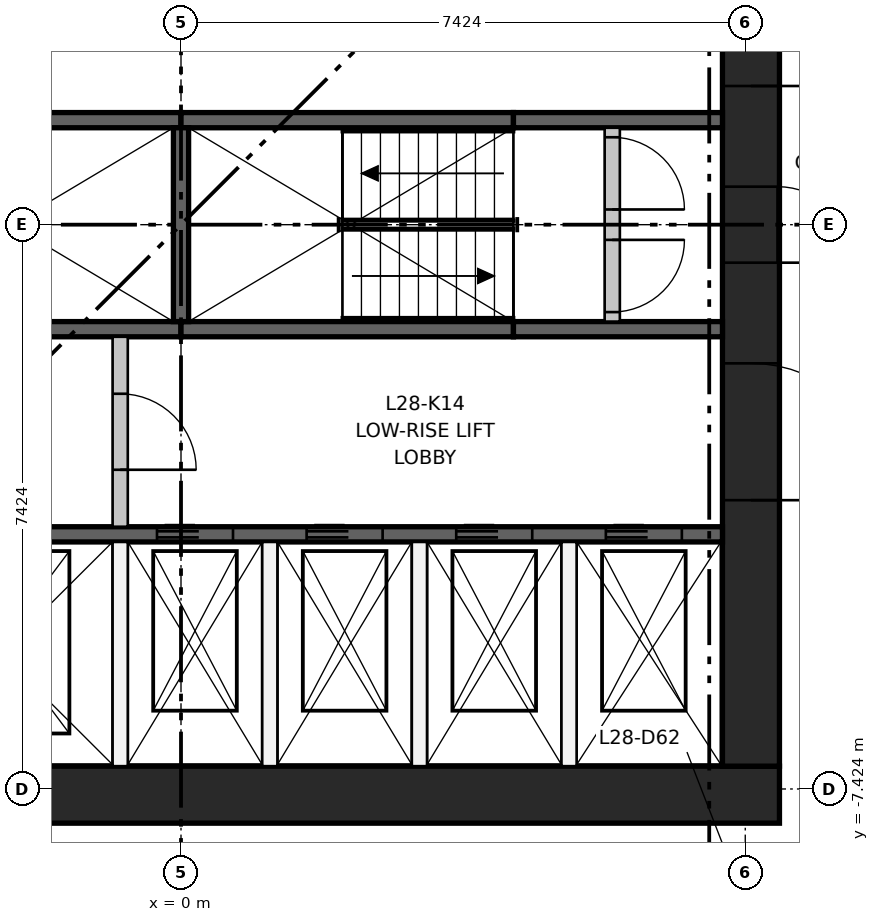
"""IFC4 building model, lengths in metres.
Left out: names, types, materials, properties, quantities, classifications, styles, units other than length and angle.
Written with IfcOpenShell. Run it as: python <this file> out.ifc"""

import sys

from ifc_helpers import new_model, si_unit, direction, frame, frame_2d, origin, place, context, subcontext, project, spatial, rectangle, extrude, element, fill, save


model = new_model("IFC4")
c1 = context("Model", 3, precision=1e-05, world=origin(), true_north=direction((0.0, 1.0)))
c2 = subcontext(c1, "Body", "Model", "MODEL_VIEW")
j1 = project(units=[si_unit("LENGTHUNIT", "METRE"), si_unit("PLANEANGLEUNIT", "RADIAN")], contexts=[c1])
p1 = place(None, origin())
s1 = spatial("IfcSite", under=j1, at=p1, CompositionType="ELEMENT")
p2 = place(p1, origin())
s2 = spatial("IfcBuilding", under=s1, at=p2, CompositionType="ELEMENT")
p3 = place(p2, frame((0.0, 0.0, 109.25)))
s3 = spatial("IfcBuildingStorey", under=s2, at=p3, CompositionType="ELEMENT", Elevation=109.25)
p4 = place(p3, frame((-7.874, -7.499, 0.0), z_axis=(0.0, 0.0, 1.0), x_axis=(1.0, 0.0, 0.0)))
e1 = element("IfcWall", 1, at=p4, inside=s3, PredefinedType="SHEAR", context=c2, shape_type="SweptSolid", body=[
    extrude(rectangle(XDim=15.748, YDim=0.75, at=frame_2d((7.874, 0.0))), origin(), (0.0, 0.0, 1.0), 3.65),
])
p5 = place(p3, frame((7.499, -7.124, 0.0), z_axis=(0.0, 0.0, 1.0), x_axis=(0.0, 1.0, 0.0)))
e2 = element("IfcWall", 2, at=p5, inside=s3, PredefinedType="SHEAR", context=c2, shape_type="SweptSolid", body=[
    extrude(rectangle(XDim=14.248, YDim=0.75, at=frame_2d((7.124, 0.0))), origin(), (0.0, 0.0, 1.0), 3.65),
])
p6 = place(p5, frame((6.624, 0.0, 0.0)))
e3 = element("IfcOpeningElement", 3, at=p6, cuts=e2, PredefinedType="OPENING", context=c2, shape_type="SweptSolid", body=[
    extrude(rectangle(XDim=1.0, YDim=2.1, at=frame_2d((0.5, 1.05))), frame((0.0, 0.385, 0.0), z_axis=(0.0, -1.0, 0.0), x_axis=(1.0, 0.0, 0.0)), (0.0, 0.0, 1.0), 0.77),
])
p7 = place(p5, frame((3.5, 0.0, 0.0)))
e4 = element("IfcOpeningElement", 4, at=p7, cuts=e2, PredefinedType="OPENING", context=c2, shape_type="SweptSolid", body=[
    extrude(rectangle(XDim=1.8, YDim=2.1, at=frame_2d((0.9, 1.05))), frame((0.0, 0.385, 0.0), z_axis=(0.0, -1.0, 0.0), x_axis=(1.0, 0.0, 0.0)), (0.0, 0.0, 1.0), 0.77),
])
p8 = place(p5, frame((8.948, 0.0, 0.0)))
e5 = element("IfcOpeningElement", 5, at=p8, cuts=e2, PredefinedType="OPENING", context=c2, shape_type="SweptSolid", body=[
    extrude(rectangle(XDim=1.8, YDim=2.1, at=frame_2d((0.9, 1.05))), frame((0.0, 0.385, 0.0), z_axis=(0.0, -1.0, 0.0), x_axis=(1.0, 0.0, 0.0)), (0.0, 0.0, 1.0), 0.77),
])
p9 = place(p3, frame((-7.124, -4.074, 0.0), z_axis=(0.0, 0.0, 1.0), x_axis=(1.0, 0.0, 0.0)))
e6 = element("IfcWall", 6, at=p9, inside=s3, PredefinedType="SHEAR", context=c2, shape_type="SweptSolid", body=[
    extrude(rectangle(XDim=14.248, YDim=0.2, at=frame_2d((7.124, 0.0))), origin(), (0.0, 0.0, 1.0), 3.3),
])
p10 = place(p9, frame((1.069, 0.0, 0.0)))
e7 = element("IfcOpeningElement", 7, at=p10, cuts=e6, PredefinedType="OPENING", context=c2, shape_type="SweptSolid", body=[
    extrude(rectangle(XDim=1.1, YDim=2.1, at=frame_2d((0.55, 1.05))), frame((0.0, 0.11, 0.0), z_axis=(0.0, -1.0, 0.0), x_axis=(1.0, 0.0, 0.0)), (0.0, 0.0, 1.0), 0.22),
])
p11 = place(p9, frame((4.206, 0.0, 0.0)))
e8 = element("IfcOpeningElement", 8, at=p11, cuts=e6, PredefinedType="OPENING", context=c2, shape_type="SweptSolid", body=[
    extrude(rectangle(XDim=1.1, YDim=2.1, at=frame_2d((0.55, 1.05))), frame((0.0, 0.11, 0.0), z_axis=(0.0, -1.0, 0.0), x_axis=(1.0, 0.0, 0.0)), (0.0, 0.0, 1.0), 0.22),
])
p12 = place(p9, frame((6.808, 0.0, 0.0)))
e9 = element("IfcOpeningElement", 9, at=p12, cuts=e6, PredefinedType="OPENING", context=c2, shape_type="SweptSolid", body=[
    extrude(rectangle(XDim=1.0, YDim=2.1, at=frame_2d((0.5, 1.05))), frame((0.0, 0.11, 0.0), z_axis=(0.0, -1.0, 0.0), x_axis=(1.0, 0.0, 0.0)), (0.0, 0.0, 1.0), 0.22),
])
p13 = place(p9, frame((8.777, 0.0, 0.0)))
e10 = element("IfcOpeningElement", 10, at=p13, cuts=e6, PredefinedType="OPENING", context=c2, shape_type="SweptSolid", body=[
    extrude(rectangle(XDim=1.0, YDim=2.1, at=frame_2d((0.5, 1.05))), frame((0.0, 0.11, 0.0), z_axis=(0.0, -1.0, 0.0), x_axis=(1.0, 0.0, 0.0)), (0.0, 0.0, 1.0), 0.22),
])
p14 = place(p9, frame((10.745, 0.0, 0.0)))
e11 = element("IfcOpeningElement", 11, at=p14, cuts=e6, PredefinedType="OPENING", context=c2, shape_type="SweptSolid", body=[
    extrude(rectangle(XDim=1.0, YDim=2.1, at=frame_2d((0.5, 1.05))), frame((0.0, 0.11, 0.0), z_axis=(0.0, -1.0, 0.0), x_axis=(1.0, 0.0, 0.0)), (0.0, 0.0, 1.0), 0.22),
])
p15 = place(p9, frame((12.714, 0.0, 0.0)))
e12 = element("IfcOpeningElement", 12, at=p15, cuts=e6, PredefinedType="OPENING", context=c2, shape_type="SweptSolid", body=[
    extrude(rectangle(XDim=1.0, YDim=2.1, at=frame_2d((0.5, 1.05))), frame((0.0, 0.11, 0.0), z_axis=(0.0, -1.0, 0.0), x_axis=(1.0, 0.0, 0.0)), (0.0, 0.0, 1.0), 0.22),
])
for number, where, z_axis, x_axis in (
    (13, (-4.374, -1.375, 0.0), (0.0, 0.0, 1.0), (1.0, 0.0, 0.0)),
    (14, (0.0, -1.375, 0.0), (0.0, 0.0, 1.0), (1.0, 0.0, 0.0)),
):
    element("IfcWall", number, at=place(p3, frame(where, z_axis=z_axis, x_axis=x_axis)), inside=s3, PredefinedType="SHEAR", context=c2, shape_type="SweptSolid", body=[
        extrude(rectangle(XDim=4.374, YDim=0.2, at=frame_2d((2.187, 0.0))), origin(), (0.0, 0.0, 1.0), 3.3),
    ])
p16 = place(p3, frame((4.374, -1.375, 0.0), z_axis=(0.0, 0.0, 1.0), x_axis=(1.0, 0.0, 0.0)))
e15 = element("IfcWall", 15, at=p16, inside=s3, PredefinedType="SHEAR", context=c2, shape_type="SweptSolid", body=[
    extrude(rectangle(XDim=2.75, YDim=0.2, at=frame_2d((1.375, 0.0))), origin(), (0.0, 0.0, 1.0), 3.3),
])
for number, where, z_axis, x_axis in (
    (16, (-4.374, 1.375, 0.0), (0.0, 0.0, 1.0), (1.0, 0.0, 0.0)),
    (17, (0.0, 1.375, 0.0), (0.0, 0.0, 1.0), (1.0, 0.0, 0.0)),
):
    element("IfcWall", number, at=place(p3, frame(where, z_axis=z_axis, x_axis=x_axis)), inside=s3, PredefinedType="SHEAR", context=c2, shape_type="SweptSolid", body=[
        extrude(rectangle(XDim=4.374, YDim=0.2, at=frame_2d((2.187, 0.0))), origin(), (0.0, 0.0, 1.0), 3.3),
    ])
p17 = place(p3, frame((4.374, 1.375, 0.0), z_axis=(0.0, 0.0, 1.0), x_axis=(1.0, 0.0, 0.0)))
e18 = element("IfcWall", 18, at=p17, inside=s3, PredefinedType="SHEAR", context=c2, shape_type="SweptSolid", body=[
    extrude(rectangle(XDim=2.75, YDim=0.2, at=frame_2d((1.375, 0.0))), origin(), (0.0, 0.0, 1.0), 3.3),
])
p18 = place(p3, frame((0.0, -1.275, 0.0), z_axis=(0.0, 0.0, 1.0), x_axis=(0.0, 1.0, 0.0)))
e19 = element("IfcWall", 19, at=p18, inside=s3, PredefinedType="SHEAR", context=c2, shape_type="SweptSolid", body=[
    extrude(rectangle(XDim=2.55, YDim=0.2, at=frame_2d((1.275, 0.0))), origin(), (0.0, 0.0, 1.0), 3.3),
])
p19 = place(p3, frame((-0.8, -7.124, 0.0), z_axis=(0.0, 0.0, 1.0), x_axis=(0.0, 1.0, 0.0)))
e20 = element("IfcWall", 20, at=p19, inside=s3, PredefinedType="PARTITIONING", context=c2, shape_type="SweptSolid", body=[
    extrude(rectangle(XDim=2.95, YDim=0.2, at=frame_2d((1.475, 0.0))), origin(), (0.0, 0.0, 1.0), 3.3),
])
p20 = place(p3, frame((-0.8, -3.974, 0.0), z_axis=(0.0, 0.0, 1.0), x_axis=(0.0, 1.0, 0.0)))
e21 = element("IfcWall", 21, at=p20, inside=s3, PredefinedType="PARTITIONING", context=c2, shape_type="SweptSolid", body=[
    extrude(rectangle(XDim=2.499, YDim=0.2, at=frame_2d((1.25, 0.0))), origin(), (0.0, 0.0, 1.0), 3.3),
])
p21 = place(p20, frame((0.75, 0.0, 0.0)))
e22 = element("IfcOpeningElement", 22, at=p21, cuts=e21, PredefinedType="OPENING", context=c2, shape_type="SweptSolid", body=[
    extrude(rectangle(XDim=1.0, YDim=2.1, at=frame_2d((0.5, 1.05))), frame((0.0, 0.11, 0.0), z_axis=(0.0, -1.0, 0.0), x_axis=(1.0, 0.0, 0.0)), (0.0, 0.0, 1.0), 0.22),
])
for number, where, z_axis, x_axis in (
    (23, (1.168, -7.124, 0.0), (0.0, 0.0, 1.0), (0.0, 1.0, 0.0)),
    (24, (3.137, -7.124, 0.0), (0.0, 0.0, 1.0), (0.0, 1.0, 0.0)),
    (25, (5.105, -7.124, 0.0), (0.0, 0.0, 1.0), (0.0, 1.0, 0.0)),
):
    element("IfcWall", number, at=place(p3, frame(where, z_axis=z_axis, x_axis=x_axis)), inside=s3, PredefinedType="PARTITIONING", context=c2, shape_type="SweptSolid", body=[
        extrude(rectangle(XDim=2.95, YDim=0.2, at=frame_2d((1.475, 0.0))), origin(), (0.0, 0.0, 1.0), 3.3),
    ])
p22 = place(p3, frame((5.674, -1.275, 0.0), z_axis=(0.0, 0.0, 1.0), x_axis=(0.0, 1.0, 0.0)))
e26 = element("IfcWall", 26, at=p22, inside=s3, PredefinedType="PARTITIONING", context=c2, shape_type="SweptSolid", body=[
    extrude(rectangle(XDim=2.55, YDim=0.2, at=frame_2d((1.275, 0.0))), origin(), (0.0, 0.0, 1.0), 3.3),
])
p23 = place(p22, frame((0.125, 0.0, 0.0)))
e27 = element("IfcOpeningElement", 27, at=p23, cuts=e26, PredefinedType="OPENING", context=c2, shape_type="SweptSolid", body=[
    extrude(rectangle(XDim=0.95, YDim=2.1, at=frame_2d((0.475, 1.05))), frame((0.0, 0.11, 0.0), z_axis=(0.0, -1.0, 0.0), x_axis=(1.0, 0.0, 0.0)), (0.0, 0.0, 1.0), 0.22),
])
p24 = place(p22, frame((1.475, 0.0, 0.0)))
e28 = element("IfcOpeningElement", 28, at=p24, cuts=e26, PredefinedType="OPENING", context=c2, shape_type="SweptSolid", body=[
    extrude(rectangle(XDim=0.95, YDim=2.1, at=frame_2d((0.475, 1.05))), frame((0.0, 0.11, 0.0), z_axis=(0.0, -1.0, 0.0), x_axis=(1.0, 0.0, 0.0)), (0.0, 0.0, 1.0), 0.22),
])
p25 = place(p12, origin())
e29 = element("IfcDoor", 29, at=p25, inside=s3, OperationType="DOUBLE_DOOR_SLIDING", PredefinedType="DOOR", context=c2, shape_type="SweptSolid", body=[
    extrude(rectangle(XDim=1.0, YDim=2.1, at=frame_2d((0.5, 1.05))), frame((0.0, 0.025, 0.0), z_axis=(0.0, -1.0, 0.0), x_axis=(1.0, 0.0, 0.0)), (0.0, 0.0, 1.0), 0.05),
])
fill(e9, e29)
p26 = place(p13, origin())
e30 = element("IfcDoor", 30, at=p26, inside=s3, OperationType="DOUBLE_DOOR_SLIDING", PredefinedType="DOOR", context=c2, shape_type="SweptSolid", body=[
    extrude(rectangle(XDim=1.0, YDim=2.1, at=frame_2d((0.5, 1.05))), frame((0.0, 0.025, 0.0), z_axis=(0.0, -1.0, 0.0), x_axis=(1.0, 0.0, 0.0)), (0.0, 0.0, 1.0), 0.05),
])
fill(e10, e30)
p27 = place(p14, origin())
e31 = element("IfcDoor", 31, at=p27, inside=s3, OperationType="DOUBLE_DOOR_SLIDING", PredefinedType="DOOR", context=c2, shape_type="SweptSolid", body=[
    extrude(rectangle(XDim=1.0, YDim=2.1, at=frame_2d((0.5, 1.05))), frame((0.0, 0.025, 0.0), z_axis=(0.0, -1.0, 0.0), x_axis=(1.0, 0.0, 0.0)), (0.0, 0.0, 1.0), 0.05),
])
fill(e11, e31)
p28 = place(p15, origin())
e32 = element("IfcDoor", 32, at=p28, inside=s3, OperationType="DOUBLE_DOOR_SLIDING", PredefinedType="DOOR", context=c2, shape_type="SweptSolid", body=[
    extrude(rectangle(XDim=1.0, YDim=2.1, at=frame_2d((0.5, 1.05))), frame((0.0, 0.025, 0.0), z_axis=(0.0, -1.0, 0.0), x_axis=(1.0, 0.0, 0.0)), (0.0, 0.0, 1.0), 0.05),
])
fill(e12, e32)
p29 = place(p23, frame((0.95, 0.0, 0.0), z_axis=(0.0, 0.0, 1.0), x_axis=(-1.0, 0.0, 0.0)))
e33 = element("IfcDoor", 33, at=p29, inside=s3, OperationType="SINGLE_SWING_RIGHT", PredefinedType="DOOR", context=c2, shape_type="SweptSolid", body=[
    extrude(rectangle(XDim=0.95, YDim=2.1, at=frame_2d((0.475, 1.05))), frame((0.0, 0.025, 0.0), z_axis=(0.0, -1.0, 0.0), x_axis=(1.0, 0.0, 0.0)), (0.0, 0.0, 1.0), 0.05),
])
fill(e27, e33)
p30 = place(p24, frame((0.95, 0.0, 0.0), z_axis=(0.0, 0.0, 1.0), x_axis=(-1.0, 0.0, 0.0)))
e34 = element("IfcDoor", 34, at=p30, inside=s3, OperationType="SINGLE_SWING_LEFT", PredefinedType="DOOR", context=c2, shape_type="SweptSolid", body=[
    extrude(rectangle(XDim=0.95, YDim=2.1, at=frame_2d((0.475, 1.05))), frame((0.0, 0.025, 0.0), z_axis=(0.0, -1.0, 0.0), x_axis=(1.0, 0.0, 0.0)), (0.0, 0.0, 1.0), 0.05),
])
fill(e28, e34)
p31 = place(p21, frame((1.0, 0.0, 0.0), z_axis=(0.0, 0.0, 1.0), x_axis=(-1.0, 0.0, 0.0)))
e35 = element("IfcDoor", 35, at=p31, inside=s3, OperationType="SINGLE_SWING_LEFT", PredefinedType="DOOR", context=c2, shape_type="SweptSolid", body=[
    extrude(rectangle(XDim=1.0, YDim=2.1, at=frame_2d((0.5, 1.05))), frame((0.0, 0.025, 0.0), z_axis=(0.0, -1.0, 0.0), x_axis=(1.0, 0.0, 0.0)), (0.0, 0.0, 1.0), 0.05),
])
fill(e22, e35)
p32 = place(p6, frame((1.0, 0.0, 0.0), z_axis=(0.0, 0.0, 1.0), x_axis=(-1.0, 0.0, 0.0)))
e36 = element("IfcDoor", 36, at=p32, inside=s3, OperationType="SINGLE_SWING_LEFT", PredefinedType="DOOR", context=c2, shape_type="SweptSolid", body=[
    extrude(rectangle(XDim=1.0, YDim=2.1, at=frame_2d((0.5, 1.05))), frame((0.0, 0.375, 0.0), z_axis=(0.0, -1.0, 0.0), x_axis=(1.0, 0.0, 0.0)), (0.0, 0.0, 1.0), 0.05),
])
fill(e3, e36)
p33 = place(p7, frame((1.8, 0.0, 0.0), z_axis=(0.0, 0.0, 1.0), x_axis=(-1.0, 0.0, 0.0)))
e37 = element("IfcDoor", 37, at=p33, inside=s3, OperationType="DOUBLE_DOOR_SINGLE_SWING", PredefinedType="DOOR", context=c2, shape_type="SweptSolid", body=[
    extrude(rectangle(XDim=1.8, YDim=2.1, at=frame_2d((0.9, 1.05))), frame((0.0, 0.025, 0.0), z_axis=(0.0, -1.0, 0.0), x_axis=(1.0, 0.0, 0.0)), (0.0, 0.0, 1.0), 0.05),
])
fill(e4, e37)
p34 = place(p8, frame((1.8, 0.0, 0.0), z_axis=(0.0, 0.0, 1.0), x_axis=(-1.0, 0.0, 0.0)))
e38 = element("IfcDoor", 38, at=p34, inside=s3, OperationType="DOUBLE_DOOR_SINGLE_SWING", PredefinedType="DOOR", context=c2, shape_type="SweptSolid", body=[
    extrude(rectangle(XDim=1.8, YDim=2.1, at=frame_2d((0.9, 1.05))), frame((0.0, 0.025, 0.0), z_axis=(0.0, -1.0, 0.0), x_axis=(1.0, 0.0, 0.0)), (0.0, 0.0, 1.0), 0.05),
])
fill(e5, e38)
save(model, sys.argv[1])
